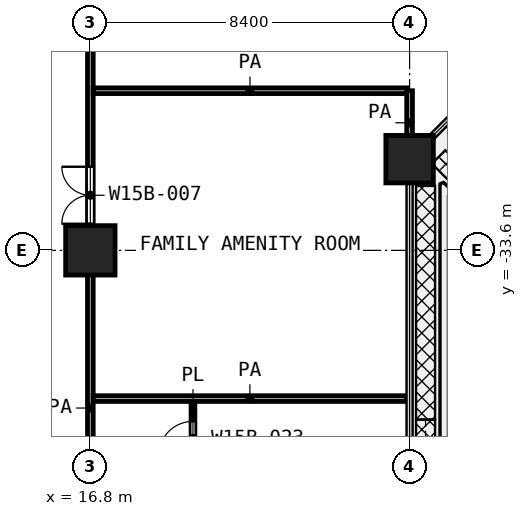
"""IFC4 building model, lengths in metres.
Left out: names, types, materials, properties, quantities, classifications, styles, units other than length and angle.
Written with IfcOpenShell. Run it as: python <this file> out.ifc"""

import sys

from ifc_helpers import new_model, si_unit, direction, frame, frame_2d, origin, origin_2d, place, context, subcontext, project, spatial, rectangle, extrude, element, fill, save


model = new_model("IFC4")
c1 = context("Model", 3, precision=1e-05, world=origin(), true_north=direction((0.0, 1.0)))
c2 = subcontext(c1, "Body", "Model", "MODEL_VIEW")
j1 = project(units=[si_unit("LENGTHUNIT", "METRE"), si_unit("PLANEANGLEUNIT", "RADIAN")], contexts=[c1])
p1 = place(None, origin())
s1 = spatial("IfcSite", under=j1, at=p1, CompositionType="ELEMENT")
p2 = place(p1, origin())
s2 = spatial("IfcBuilding", under=s1, at=p2, CompositionType="ELEMENT")
p3 = place(p2, frame((0.0, 0.0, 85.4)))
s3 = spatial("IfcBuildingStorey", under=s2, at=p3, CompositionType="ELEMENT", Elevation=85.4)
p4 = place(p3, frame((25.2, -31.2, 0.0), z_axis=(0.0, 0.0, 1.0), x_axis=(1.0, 0.0, 0.0)))
e1 = element("IfcColumn", 1, at=p4, inside=s3, PredefinedType="COLUMN", context=c2, shape_type="SweptSolid", body=[
    extrude(rectangle(XDim=1.25, YDim=1.25, at=origin_2d()), origin(), (0.0, 0.0, 1.0), 4.2),
])
p5 = place(p3, frame((16.8, -33.6, 0.0), z_axis=(0.0, 0.0, 1.0), x_axis=(1.0, 0.0, 0.0)))
e2 = element("IfcColumn", 2, at=p5, inside=s3, PredefinedType="COLUMN", context=c2, shape_type="SweptSolid", body=[
    extrude(rectangle(XDim=1.3, YDim=1.3, at=origin_2d()), origin(), (0.0, 0.0, 1.0), 4.2),
])
p6 = place(p3, frame((19.5, -39.6, 0.0), z_axis=(0.0, 0.0, 1.0), x_axis=(0.0, 1.0, 0.0)))
e3 = element("IfcWall", 3, at=p6, inside=s3, PredefinedType="PARTITIONING", context=c2, shape_type="SweptSolid", body=[
    extrude(rectangle(XDim=2.025, YDim=0.1, at=frame_2d((1.013, 0.0))), origin(), (0.0, 0.0, 1.0), 3.9),
])
p7 = place(p6, frame((0.6, 0.0, 0.0)))
e4 = element("IfcOpeningElement", 4, at=p7, cuts=e3, PredefinedType="OPENING", context=c2, shape_type="SweptSolid", body=[
    extrude(rectangle(XDim=0.9, YDim=2.1, at=frame_2d((0.45, 1.05))), frame((0.0, 0.06, 0.0), z_axis=(0.0, -1.0, 0.0), x_axis=(1.0, 0.0, 0.0)), (0.0, 0.0, 1.0), 0.12),
])
p8 = place(p3, frame((16.875, -37.5, 0.0), z_axis=(0.0, 0.0, 1.0), x_axis=(1.0, 0.0, 0.0)))
e5 = element("IfcWall", 5, at=p8, inside=s3, PredefinedType="PARTITIONING", context=c2, shape_type="SweptSolid", body=[
    extrude(rectangle(XDim=8.245, YDim=0.15, at=frame_2d((4.123, 0.0))), origin(), (0.0, 0.0, 1.0), 3.9),
])
p9 = place(p3, frame((16.875, -29.4, 0.0), z_axis=(0.0, 0.0, 1.0), x_axis=(1.0, 0.0, 0.0)))
e6 = element("IfcWall", 6, at=p9, inside=s3, PredefinedType="PARTITIONING", context=c2, shape_type="SweptSolid", body=[
    extrude(rectangle(XDim=8.25, YDim=0.15, at=frame_2d((4.125, 0.0))), origin(), (0.0, 0.0, 1.0), 3.9),
])
p10 = place(p3, frame((16.8, -50.398, 0.0), z_axis=(0.0, 0.0, 1.0), x_axis=(0.0, 1.0, 0.0)))
e7 = element("IfcWall", 7, at=p10, inside=s3, PredefinedType="PARTITIONING", context=c2, shape_type="SweptSolid", body=[
    extrude(rectangle(XDim=25.298, YDim=0.15, at=frame_2d((12.649, 0.0))), origin(), (0.0, 0.0, 1.0), 3.9),
])
p11 = place(p10, frame((17.498, 0.0, 0.0)))
e8 = element("IfcOpeningElement", 8, at=p11, cuts=e7, PredefinedType="OPENING", context=c2, shape_type="SweptSolid", body=[
    extrude(rectangle(XDim=1.5, YDim=2.1, at=frame_2d((0.75, 1.05))), frame((0.0, 0.085, 0.0), z_axis=(0.0, -1.0, 0.0), x_axis=(1.0, 0.0, 0.0)), (0.0, 0.0, 1.0), 0.17),
])
p12 = place(p10, frame((9.398, 0.0, 0.0)))
e9 = element("IfcOpeningElement", 9, at=p12, cuts=e7, PredefinedType="OPENING", context=c2, shape_type="SweptSolid", body=[
    extrude(rectangle(XDim=1.2, YDim=2.1, at=frame_2d((0.6, 1.05))), frame((0.0, 0.085, 0.0), z_axis=(0.0, -1.0, 0.0), x_axis=(1.0, 0.0, 0.0)), (0.0, 0.0, 1.0), 0.17),
])
p13 = place(p10, frame((6.498, 0.0, 0.0)))
e10 = element("IfcOpeningElement", 10, at=p13, cuts=e7, PredefinedType="OPENING", context=c2, shape_type="SweptSolid", body=[
    extrude(rectangle(XDim=1.2, YDim=2.1, at=frame_2d((0.6, 1.05))), frame((0.0, 0.085, 0.0), z_axis=(0.0, -1.0, 0.0), x_axis=(1.0, 0.0, 0.0)), (0.0, 0.0, 1.0), 0.17),
])
p14 = place(p10, frame((0.698, 0.0, 0.0)))
e11 = element("IfcOpeningElement", 11, at=p14, cuts=e7, PredefinedType="OPENING", context=c2, shape_type="SweptSolid", body=[
    extrude(rectangle(XDim=0.9, YDim=2.1, at=frame_2d((0.45, 1.05))), frame((0.0, 0.085, 0.0), z_axis=(0.0, -1.0, 0.0), x_axis=(1.0, 0.0, 0.0)), (0.0, 0.0, 1.0), 0.17),
])
p15 = place(p3, frame((25.2, -31.087, 0.0), z_axis=(0.0, 0.0, 1.0), x_axis=(0.0, 1.0, 0.0)))
e12 = element("IfcWall", 12, at=p15, inside=s3, PredefinedType="PARTITIONING", context=c2, shape_type="SweptSolid", body=[
    extrude(rectangle(XDim=1.687, YDim=0.15, at=frame_2d((0.844, 0.0))), origin(), (0.0, 0.0, 1.0), 3.9),
])
p16 = place(p11, origin())
e13 = element("IfcDoor", 13, at=p16, inside=s3, OperationType="DOUBLE_DOOR_SINGLE_SWING", PredefinedType="DOOR", context=c2, shape_type="SweptSolid", body=[
    extrude(rectangle(XDim=1.5, YDim=2.1, at=frame_2d((0.75, 1.05))), frame((0.0, 0.025, 0.0), z_axis=(0.0, -1.0, 0.0), x_axis=(1.0, 0.0, 0.0)), (0.0, 0.0, 1.0), 0.05),
])
fill(e8, e13)
p17 = place(p7, origin())
e14 = element("IfcDoor", 14, at=p17, inside=s3, OperationType="SINGLE_SWING_LEFT", PredefinedType="DOOR", context=c2, shape_type="SweptSolid", body=[
    extrude(rectangle(XDim=0.9, YDim=2.1, at=frame_2d((0.45, 1.05))), frame((0.0, 0.025, 0.0), z_axis=(0.0, -1.0, 0.0), x_axis=(1.0, 0.0, 0.0)), (0.0, 0.0, 1.0), 0.05),
])
fill(e4, e14)
save(model, sys.argv[1])
